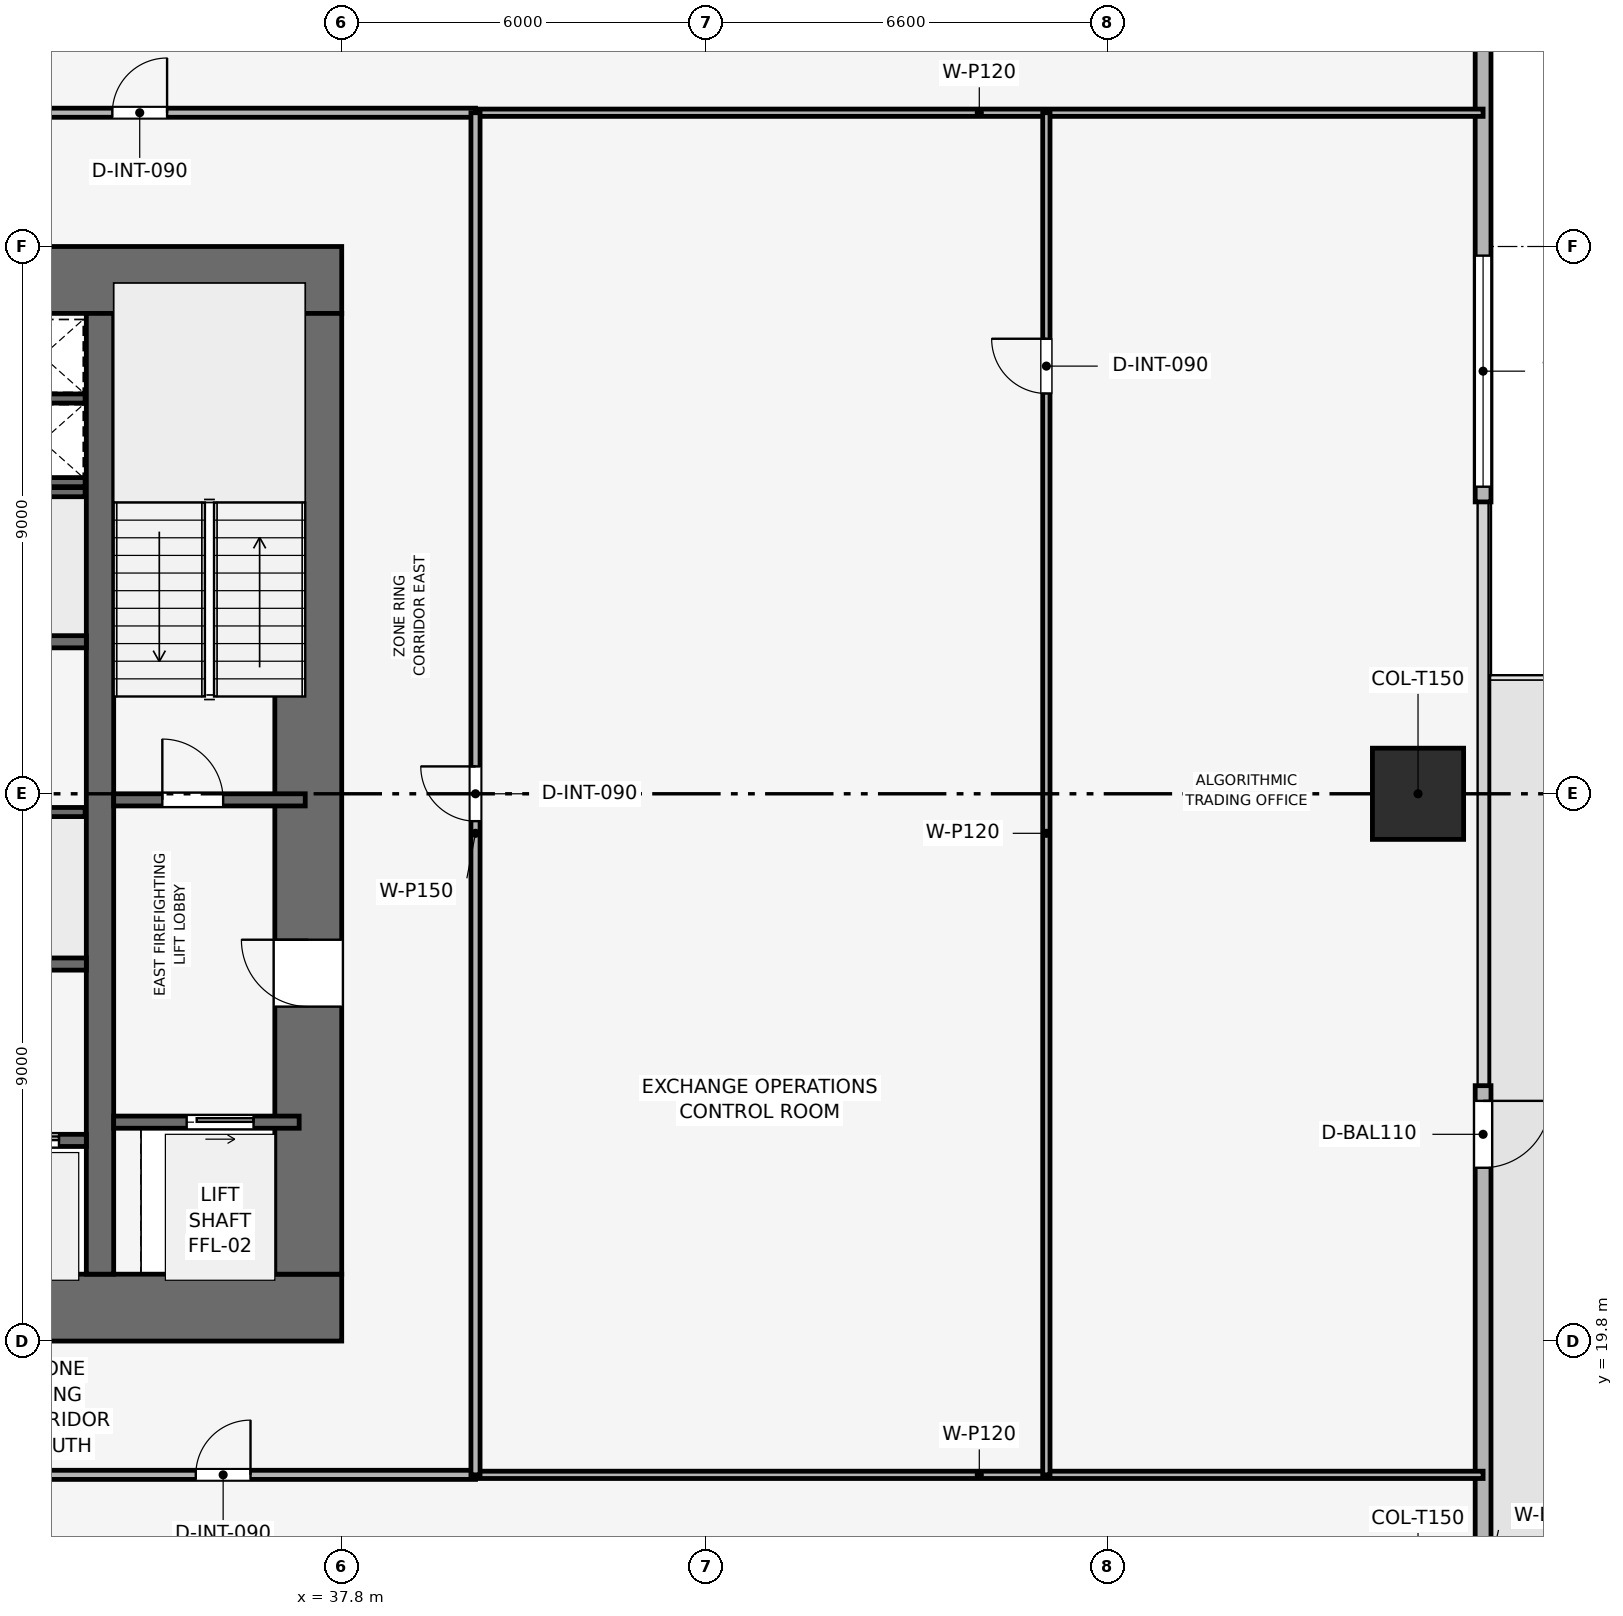
"""IFC4 building model, lengths in metres.
Left out: names, types, materials, properties, quantities, classifications, styles, units other than length and angle.
Written with IfcOpenShell. Run it as: python <this file> out.ifc"""

import sys

from ifc_helpers import new_model, si_unit, direction, frame, frame_2d, origin, origin_2d, place, context, subcontext, project, spatial, rectangle, extrude, element, fill, save


model = new_model("IFC4")
c1 = context("Model", 3, precision=1e-05, world=origin(), true_north=direction((0.0, 1.0)))
c2 = subcontext(c1, "Body", "Model", "MODEL_VIEW")
j1 = project(units=[si_unit("LENGTHUNIT", "METRE"), si_unit("PLANEANGLEUNIT", "RADIAN")], contexts=[c1])
p1 = place(None, origin())
s1 = spatial("IfcSite", under=j1, at=p1, CompositionType="ELEMENT")
p2 = place(p1, origin())
s2 = spatial("IfcBuilding", under=s1, at=p2, CompositionType="ELEMENT")
p3 = place(p2, frame((0.0, 0.0, 53.4)))
s3 = spatial("IfcBuildingStorey", under=s2, at=p3, CompositionType="ELEMENT", Elevation=53.4)
p4 = place(p3, frame((19.8, 20.35, 0.0), z_axis=(0.0, 0.0, 1.0), x_axis=(1.0, 0.0, 0.0)))
e1 = element("IfcWall", 1, at=p4, inside=s3, PredefinedType="SHEAR", context=c2, shape_type="SweptSolid", body=[
    extrude(rectangle(XDim=18.0, YDim=1.1, at=frame_2d((9.0, 0.0))), origin(), (0.0, 0.0, 1.0), 3.9),
])
p5 = place(p4, frame((8.4, 0.0, 0.0)))
e2 = element("IfcOpeningElement", 2, at=p5, cuts=e1, PredefinedType="OPENING", context=c2, shape_type="SweptSolid", body=[
    extrude(rectangle(XDim=1.2, YDim=2.2, at=frame_2d((0.6, 1.1))), frame((0.0, 0.56, 0.0), z_axis=(0.0, -1.0, 0.0), x_axis=(1.0, 0.0, 0.0)), (0.0, 0.0, 1.0), 1.12),
])
p6 = place(p3, frame((19.8, 37.25, 0.0), z_axis=(0.0, 0.0, 1.0), x_axis=(1.0, 0.0, 0.0)))
e3 = element("IfcWall", 3, at=p6, inside=s3, PredefinedType="SHEAR", context=c2, shape_type="SweptSolid", body=[
    extrude(rectangle(XDim=18.0, YDim=1.1, at=frame_2d((9.0, 0.0))), origin(), (0.0, 0.0, 1.0), 3.9),
])
p7 = place(p6, frame((7.05, 0.0, 0.0)))
e4 = element("IfcOpeningElement", 4, at=p7, cuts=e3, PredefinedType="OPENING", context=c2, shape_type="SweptSolid", body=[
    extrude(rectangle(XDim=1.1, YDim=2.15, at=frame_2d((0.55, 1.075))), frame((0.0, 0.56, 0.0), z_axis=(0.0, -1.0, 0.0), x_axis=(1.0, 0.0, 0.0)), (0.0, 0.0, 1.0), 1.12),
])
p8 = place(p3, frame((37.25, 20.9, 0.0), z_axis=(0.0, 0.0, 1.0), x_axis=(0.0, 1.0, 0.0)))
e5 = element("IfcWall", 5, at=p8, inside=s3, PredefinedType="SHEAR", context=c2, shape_type="SweptSolid", body=[
    extrude(rectangle(XDim=15.8, YDim=1.1, at=frame_2d((7.9, 0.0))), origin(), (0.0, 0.0, 1.0), 3.9),
])
p9 = place(p8, frame((4.4, 0.0, 0.0)))
e6 = element("IfcOpeningElement", 6, at=p9, cuts=e5, PredefinedType="OPENING", context=c2, shape_type="SweptSolid", body=[
    extrude(rectangle(XDim=1.1, YDim=2.15, at=frame_2d((0.55, 1.075))), frame((0.0, 0.56, 0.0), z_axis=(0.0, -1.0, 0.0), x_axis=(1.0, 0.0, 0.0)), (0.0, 0.0, 1.0), 1.12),
])
p10 = place(p3, frame((33.825, 20.9, 0.0), z_axis=(0.0, 0.0, 1.0), x_axis=(0.0, 1.0, 0.0)))
e7 = element("IfcWall", 7, at=p10, inside=s3, PredefinedType="SHEAR", context=c2, shape_type="SweptSolid", body=[
    extrude(rectangle(XDim=15.8, YDim=0.45, at=frame_2d((7.9, 0.0))), origin(), (0.0, 0.0, 1.0), 3.9),
])
p11 = place(p3, frame((55.5, 28.8, 0.003), z_axis=(0.0, 0.0, 1.0), x_axis=(1.0, 0.0, 0.0)))
e8 = element("IfcColumn", 8, at=p11, inside=s3, PredefinedType="COLUMN", context=c2, shape_type="SweptSolid", body=[
    extrude(rectangle(XDim=1.5, YDim=1.5, at=origin_2d()), origin(), (0.0, 0.0, 1.0), 3.644),
])
p12 = place(p3, frame((56.57, 48.9, 0.0), z_axis=(0.0, 0.0, 1.0), x_axis=(0.0, -1.0, 0.0)))
e9 = element("IfcWall", 9, at=p12, inside=s3, PredefinedType="SOLIDWALL", context=c2, shape_type="SweptSolid", body=[
    extrude(rectangle(XDim=15.3, YDim=0.26, at=frame_2d((7.65, 0.0))), origin(), (0.0, 0.0, 1.0), 3.65),
])
p13 = place(p12, frame((11.25, 0.0, 0.9)))
e10 = element("IfcOpeningElement", 10, at=p13, cuts=e9, PredefinedType="OPENING", context=c2, shape_type="SweptSolid", body=[
    extrude(rectangle(XDim=3.8, YDim=1.9, at=frame_2d((1.9, 0.95))), frame((0.0, 0.14, 0.0), z_axis=(0.0, -1.0, 0.0), x_axis=(1.0, 0.0, 0.0)), (0.0, 0.0, 1.0), 0.28),
])
p14 = place(p3, frame((56.57, 24.0, 0.0), z_axis=(0.0, 0.0, 1.0), x_axis=(0.0, -1.0, 0.0)))
e11 = element("IfcWall", 11, at=p14, inside=s3, PredefinedType="SOLIDWALL", context=c2, shape_type="SweptSolid", body=[
    extrude(rectangle(XDim=15.3, YDim=0.26, at=frame_2d((7.65, 0.0))), origin(), (0.0, 0.0, 1.0), 3.65),
])
p15 = place(p14, frame((0.25, 0.0, 0.0)))
e12 = element("IfcOpeningElement", 12, at=p15, cuts=e11, PredefinedType="OPENING", context=c2, shape_type="SweptSolid", body=[
    extrude(rectangle(XDim=1.1, YDim=2.2, at=frame_2d((0.55, 1.1))), frame((0.0, 0.14, 0.0), z_axis=(0.0, -1.0, 0.0), x_axis=(1.0, 0.0, 0.0)), (0.0, 0.0, 1.0), 0.28),
])
p16 = place(p3, frame((34.05, 28.7, 0.0), z_axis=(0.0, 0.0, 1.0), x_axis=(1.0, 0.0, 0.0)))
e13 = element("IfcWall", 13, at=p16, inside=s3, PredefinedType="SHEAR", context=c2, shape_type="SweptSolid", body=[
    extrude(rectangle(XDim=3.15, YDim=0.2, at=frame_2d((1.575, 0.0))), origin(), (0.0, 0.0, 1.0), 3.65),
])
p17 = place(p16, frame((0.8, 0.0, 0.0)))
e14 = element("IfcOpeningElement", 14, at=p17, cuts=e13, PredefinedType="OPENING", context=c2, shape_type="SweptSolid", body=[
    extrude(rectangle(XDim=1.0, YDim=2.1, at=frame_2d((0.5, 1.05))), frame((0.0, 0.11, 0.0), z_axis=(0.0, -1.0, 0.0), x_axis=(1.0, 0.0, 0.0)), (0.0, 0.0, 1.0), 0.22),
])
for number, where, z_axis, x_axis in (
    (15, (32.25, 33.925, 0.0), (0.0, 0.0, 1.0), (1.0, 0.0, 0.0)),
    (16, (32.25, 35.3, 0.0), (0.0, 0.0, 1.0), (1.0, 0.0, 0.0)),
):
    element("IfcWall", number, at=place(p3, frame(where, z_axis=z_axis, x_axis=x_axis)), inside=s3, PredefinedType="SHEAR", context=c2, shape_type="SweptSolid", body=[
        extrude(rectangle(XDim=1.33, YDim=0.15, at=frame_2d((0.665, 0.0))), origin(), (0.0, 0.0, 1.0), 3.65),
    ])
p18 = place(p3, frame((34.05, 23.4, 0.0), z_axis=(0.0, 0.0, 1.0), x_axis=(1.0, 0.0, 0.0)))
e17 = element("IfcWall", 17, at=p18, inside=s3, PredefinedType="SHEAR", context=c2, shape_type="SweptSolid", body=[
    extrude(rectangle(XDim=3.05, YDim=0.2, at=frame_2d((1.525, 0.0))), origin(), (0.0, 0.0, 1.0), 3.65),
])
p19 = place(p18, frame((1.2, 0.0, 0.0)))
e18 = element("IfcOpeningElement", 18, at=p19, cuts=e17, PredefinedType="OPENING", context=c2, shape_type="SweptSolid", body=[
    extrude(rectangle(XDim=1.1, YDim=2.15, at=frame_2d((0.55, 1.075))), frame((0.0, 0.11, 0.0), z_axis=(0.0, -1.0, 0.0), x_axis=(1.0, 0.0, 0.0)), (0.0, 0.0, 1.0), 0.22),
])
p20 = place(p3, frame((31.6, 23.1, 0.0), z_axis=(0.0, 0.0, 1.0), x_axis=(1.0, 0.0, 0.0)))
e19 = element("IfcWall", 19, at=p20, inside=s3, PredefinedType="SHEAR", context=c2, shape_type="SweptSolid", body=[
    extrude(rectangle(XDim=2.0, YDim=0.2, at=frame_2d((1.0, 0.0))), origin(), (0.0, 0.0, 1.0), 3.65),
])
p21 = place(p20, frame((0.45, 0.0, 0.0)))
e20 = element("IfcOpeningElement", 20, at=p21, cuts=e19, PredefinedType="OPENING", context=c2, shape_type="SweptSolid", body=[
    extrude(rectangle(XDim=1.1, YDim=2.15, at=frame_2d((0.55, 1.075))), frame((0.0, 0.11, 0.0), z_axis=(0.0, -1.0, 0.0), x_axis=(1.0, 0.0, 0.0)), (0.0, 0.0, 1.0), 0.22),
])
for number, where, z_axis, x_axis in (
    (21, (31.6, 26.0, 0.0), (0.0, 0.0, 1.0), (1.0, 0.0, 0.0)),
    (22, (31.6, 31.3, 0.0), (0.0, 0.0, 1.0), (1.0, 0.0, 0.0)),
):
    element("IfcWall", number, at=place(p3, frame(where, z_axis=z_axis, x_axis=x_axis)), inside=s3, PredefinedType="SHEAR", context=c2, shape_type="SweptSolid", body=[
        extrude(rectangle(XDim=2.0, YDim=0.2, at=frame_2d((1.0, 0.0))), origin(), (0.0, 0.0, 1.0), 3.65),
    ])
for number, where, z_axis, x_axis in (
    (23, (29.5, 28.5, 0.0), (0.0, 0.0, 1.0), (1.0, 0.0, 0.0)),
    (24, (29.5, 33.76, 0.0), (0.0, 0.0, 1.0), (1.0, 0.0, 0.0)),
):
    element("IfcWall", number, at=place(p3, frame(where, z_axis=z_axis, x_axis=x_axis)), inside=s3, PredefinedType="SHEAR", context=c2, shape_type="SweptSolid", body=[
        extrude(rectangle(XDim=4.08, YDim=0.15, at=frame_2d((2.04, 0.0))), origin(), (0.0, 0.0, 1.0), 3.65),
    ])
for number, where, z_axis, x_axis in (
    (25, (40.0, 17.6, 0.0), (0.0, 0.0, 1.0), (1.0, 0.0, 0.0)),
    (26, (40.0, 40.0, 0.0), (0.0, 0.0, 1.0), (1.0, 0.0, 0.0)),
):
    element("IfcWall", number, at=place(p3, frame(where, z_axis=z_axis, x_axis=x_axis)), inside=s3, PredefinedType="PARTITIONING", context=c2, shape_type="SweptSolid", body=[
        extrude(rectangle(XDim=16.57, YDim=0.12, at=frame_2d((8.285, 0.0))), origin(), (0.0, 0.0, 1.0), 2.935),
    ])
p22 = place(p3, frame((49.388, 17.6, 0.0), z_axis=(0.0, 0.0, 1.0), x_axis=(0.0, 1.0, 0.0)))
e27 = element("IfcWall", 27, at=p22, inside=s3, PredefinedType="PARTITIONING", context=c2, shape_type="SweptSolid", body=[
    extrude(rectangle(XDim=22.4, YDim=0.12, at=frame_2d((11.2, 0.0))), origin(), (0.0, 0.0, 1.0), 3.085),
])
p23 = place(p22, frame((17.783, 0.0, 0.0)))
e28 = element("IfcOpeningElement", 28, at=p23, cuts=e27, PredefinedType="OPENING", context=c2, shape_type="SweptSolid", body=[
    extrude(rectangle(XDim=0.9, YDim=2.1, at=frame_2d((0.45, 1.05))), frame((0.0, 0.07, 0.0), z_axis=(0.0, -1.0, 0.0), x_axis=(1.0, 0.0, 0.0)), (0.0, 0.0, 1.0), 0.14),
])
p24 = place(p3, frame((17.6, 17.6, 0.0), z_axis=(0.0, 0.0, 1.0), x_axis=(1.0, 0.0, 0.0)))
e29 = element("IfcWall", 29, at=p24, inside=s3, PredefinedType="PARTITIONING", context=c2, shape_type="SweptSolid", body=[
    extrude(rectangle(XDim=22.4, YDim=0.15, at=frame_2d((11.2, 0.0))), origin(), (0.0, 0.0, 1.0), 3.085),
])
p25 = place(p24, frame((2.4, 0.0, 0.0)))
e30 = element("IfcOpeningElement", 30, at=p25, cuts=e29, PredefinedType="OPENING", context=c2, shape_type="SweptSolid", body=[
    extrude(rectangle(XDim=0.9, YDim=2.1, at=frame_2d((0.45, 1.05))), frame((0.0, 0.085, 0.0), z_axis=(0.0, -1.0, 0.0), x_axis=(1.0, 0.0, 0.0)), (0.0, 0.0, 1.0), 0.17),
])
p26 = place(p24, frame((6.65, 0.0, 0.0)))
e31 = element("IfcOpeningElement", 31, at=p26, cuts=e29, PredefinedType="OPENING", context=c2, shape_type="SweptSolid", body=[
    extrude(rectangle(XDim=0.9, YDim=2.1, at=frame_2d((0.45, 1.05))), frame((0.0, 0.085, 0.0), z_axis=(0.0, -1.0, 0.0), x_axis=(1.0, 0.0, 0.0)), (0.0, 0.0, 1.0), 0.17),
])
p27 = place(p24, frame((9.55, 0.0, 0.0)))
e32 = element("IfcOpeningElement", 32, at=p27, cuts=e29, PredefinedType="OPENING", context=c2, shape_type="SweptSolid", body=[
    extrude(rectangle(XDim=0.9, YDim=2.1, at=frame_2d((0.45, 1.05))), frame((0.0, 0.085, 0.0), z_axis=(0.0, -1.0, 0.0), x_axis=(1.0, 0.0, 0.0)), (0.0, 0.0, 1.0), 0.17),
])
p28 = place(p24, frame((12.3, 0.0, 0.0)))
e33 = element("IfcOpeningElement", 33, at=p28, cuts=e29, PredefinedType="OPENING", context=c2, shape_type="SweptSolid", body=[
    extrude(rectangle(XDim=0.95, YDim=2.1, at=frame_2d((0.475, 1.05))), frame((0.0, 0.085, 0.0), z_axis=(0.0, -1.0, 0.0), x_axis=(1.0, 0.0, 0.0)), (0.0, 0.0, 1.0), 0.17),
])
p29 = place(p24, frame((17.8, 0.0, 0.0)))
e34 = element("IfcOpeningElement", 34, at=p29, cuts=e29, PredefinedType="OPENING", context=c2, shape_type="SweptSolid", body=[
    extrude(rectangle(XDim=0.9, YDim=2.1, at=frame_2d((0.45, 1.05))), frame((0.0, 0.085, 0.0), z_axis=(0.0, -1.0, 0.0), x_axis=(1.0, 0.0, 0.0)), (0.0, 0.0, 1.0), 0.17),
])
p30 = place(p3, frame((17.6, 40.0, 0.0), z_axis=(0.0, 0.0, 1.0), x_axis=(1.0, 0.0, 0.0)))
e35 = element("IfcWall", 35, at=p30, inside=s3, PredefinedType="PARTITIONING", context=c2, shape_type="SweptSolid", body=[
    extrude(rectangle(XDim=22.4, YDim=0.15, at=frame_2d((11.2, 0.0))), origin(), (0.0, 0.0, 1.0), 3.085),
])
p31 = place(p30, frame((0.7, 0.0, 0.0)))
e36 = element("IfcOpeningElement", 36, at=p31, cuts=e35, PredefinedType="OPENING", context=c2, shape_type="SweptSolid", body=[
    extrude(rectangle(XDim=0.9, YDim=2.1, at=frame_2d((0.45, 1.05))), frame((0.0, 0.085, 0.0), z_axis=(0.0, -1.0, 0.0), x_axis=(1.0, 0.0, 0.0)), (0.0, 0.0, 1.0), 0.17),
])
p32 = place(p30, frame((6.378, 0.0, 0.0)))
e37 = element("IfcOpeningElement", 37, at=p32, cuts=e35, PredefinedType="OPENING", context=c2, shape_type="SweptSolid", body=[
    extrude(rectangle(XDim=0.9, YDim=2.1, at=frame_2d((0.45, 1.05))), frame((0.0, 0.085, 0.0), z_axis=(0.0, -1.0, 0.0), x_axis=(1.0, 0.0, 0.0)), (0.0, 0.0, 1.0), 0.17),
])
p33 = place(p30, frame((16.428, 0.0, 0.0)))
e38 = element("IfcOpeningElement", 38, at=p33, cuts=e35, PredefinedType="OPENING", context=c2, shape_type="SweptSolid", body=[
    extrude(rectangle(XDim=0.9, YDim=2.1, at=frame_2d((0.45, 1.05))), frame((0.0, 0.085, 0.0), z_axis=(0.0, -1.0, 0.0), x_axis=(1.0, 0.0, 0.0)), (0.0, 0.0, 1.0), 0.17),
])
p34 = place(p3, frame((40.0, 17.6, 0.0), z_axis=(0.0, 0.0, 1.0), x_axis=(0.0, 1.0, 0.0)))
e39 = element("IfcWall", 39, at=p34, inside=s3, PredefinedType="PARTITIONING", context=c2, shape_type="SweptSolid", body=[
    extrude(rectangle(XDim=22.4, YDim=0.15, at=frame_2d((11.2, 0.0))), origin(), (0.0, 0.0, 1.0), 3.085),
])
p35 = place(p34, frame((10.75, 0.0, 0.0)))
e40 = element("IfcOpeningElement", 40, at=p35, cuts=e39, PredefinedType="OPENING", context=c2, shape_type="SweptSolid", body=[
    extrude(rectangle(XDim=0.9, YDim=2.1, at=frame_2d((0.45, 1.05))), frame((0.0, 0.085, 0.0), z_axis=(0.0, -1.0, 0.0), x_axis=(1.0, 0.0, 0.0)), (0.0, 0.0, 1.0), 0.17),
])
p36 = place(p15, origin())
e41 = element("IfcDoor", 41, at=p36, inside=s3, OperationType="SINGLE_SWING_LEFT", PredefinedType="DOOR", context=c2, shape_type="SweptSolid", body=[
    extrude(rectangle(XDim=1.1, YDim=2.2, at=frame_2d((0.55, 1.1))), frame((0.0, 0.025, 0.0), z_axis=(0.0, -1.0, 0.0), x_axis=(1.0, 0.0, 0.0)), (0.0, 0.0, 1.0), 0.05),
])
fill(e12, e41)
p37 = place(p13, origin())
e42 = element("IfcWindow", 42, at=p37, inside=s3, PartitioningType="SINGLE_PANEL", PredefinedType="WINDOW", context=c2, shape_type="SweptSolid", body=[
    extrude(rectangle(XDim=3.8, YDim=1.9, at=frame_2d((1.9, 0.95))), frame((0.0, 0.03, 0.0), z_axis=(0.0, -1.0, 0.0), x_axis=(1.0, 0.0, 0.0)), (0.0, 0.0, 1.0), 0.06),
])
fill(e10, e42)
p38 = place(p17, origin())
e43 = element("IfcDoor", 43, at=p38, inside=s3, OperationType="SINGLE_SWING_LEFT", PredefinedType="DOOR", context=c2, shape_type="SweptSolid", body=[
    extrude(rectangle(XDim=1.0, YDim=2.1, at=frame_2d((0.5, 1.05))), frame((0.0, 0.025, 0.0), z_axis=(0.0, -1.0, 0.0), x_axis=(1.0, 0.0, 0.0)), (0.0, 0.0, 1.0), 0.05),
])
fill(e14, e43)
p39 = place(p19, origin())
e44 = element("IfcDoor", 44, at=p39, inside=s3, OperationType="SLIDING_TO_RIGHT", PredefinedType="DOOR", context=c2, shape_type="SweptSolid", body=[
    extrude(rectangle(XDim=1.1, YDim=2.15, at=frame_2d((0.55, 1.075))), frame((0.0, 0.025, 0.0), z_axis=(0.0, -1.0, 0.0), x_axis=(1.0, 0.0, 0.0)), (0.0, 0.0, 1.0), 0.05),
])
fill(e18, e44)
p40 = place(p21, origin())
e45 = element("IfcDoor", 45, at=p40, inside=s3, OperationType="SLIDING_TO_RIGHT", PredefinedType="DOOR", context=c2, shape_type="SweptSolid", body=[
    extrude(rectangle(XDim=1.1, YDim=2.15, at=frame_2d((0.55, 1.075))), frame((0.0, 0.025, 0.0), z_axis=(0.0, -1.0, 0.0), x_axis=(1.0, 0.0, 0.0)), (0.0, 0.0, 1.0), 0.05),
])
fill(e20, e45)
p41 = place(p23, origin())
e46 = element("IfcDoor", 46, at=p41, inside=s3, OperationType="SINGLE_SWING_RIGHT", PredefinedType="DOOR", context=c2, shape_type="SweptSolid", body=[
    extrude(rectangle(XDim=0.9, YDim=2.1, at=frame_2d((0.45, 1.05))), frame((0.0, 0.025, 0.0), z_axis=(0.0, -1.0, 0.0), x_axis=(1.0, 0.0, 0.0)), (0.0, 0.0, 1.0), 0.05),
])
fill(e28, e46)
p42 = place(p29, origin())
e47 = element("IfcDoor", 47, at=p42, inside=s3, OperationType="SINGLE_SWING_RIGHT", PredefinedType="DOOR", context=c2, shape_type="SweptSolid", body=[
    extrude(rectangle(XDim=0.9, YDim=2.1, at=frame_2d((0.45, 1.05))), frame((0.0, 0.025, 0.0), z_axis=(0.0, -1.0, 0.0), x_axis=(1.0, 0.0, 0.0)), (0.0, 0.0, 1.0), 0.05),
])
fill(e34, e47)
p43 = place(p33, origin())
e48 = element("IfcDoor", 48, at=p43, inside=s3, OperationType="SINGLE_SWING_RIGHT", PredefinedType="DOOR", context=c2, shape_type="SweptSolid", body=[
    extrude(rectangle(XDim=0.9, YDim=2.1, at=frame_2d((0.45, 1.05))), frame((0.0, 0.025, 0.0), z_axis=(0.0, -1.0, 0.0), x_axis=(1.0, 0.0, 0.0)), (0.0, 0.0, 1.0), 0.05),
])
fill(e38, e48)
p44 = place(p35, origin())
e49 = element("IfcDoor", 49, at=p44, inside=s3, OperationType="SINGLE_SWING_RIGHT", PredefinedType="DOOR", context=c2, shape_type="SweptSolid", body=[
    extrude(rectangle(XDim=0.9, YDim=2.1, at=frame_2d((0.45, 1.05))), frame((0.0, 0.025, 0.0), z_axis=(0.0, -1.0, 0.0), x_axis=(1.0, 0.0, 0.0)), (0.0, 0.0, 1.0), 0.05),
])
fill(e40, e49)
p45 = place(p9, origin())
e50 = element("IfcDoor", 50, at=p45, inside=s3, OperationType="SINGLE_SWING_RIGHT", PredefinedType="DOOR", context=c2, shape_type="SweptSolid", body=[
    extrude(rectangle(XDim=1.1, YDim=2.15, at=frame_2d((0.55, 1.075))), frame((0.0, 0.025, 0.0), z_axis=(0.0, -1.0, 0.0), x_axis=(1.0, 0.0, 0.0)), (0.0, 0.0, 1.0), 0.05),
])
fill(e6, e50)
save(model, sys.argv[1])
